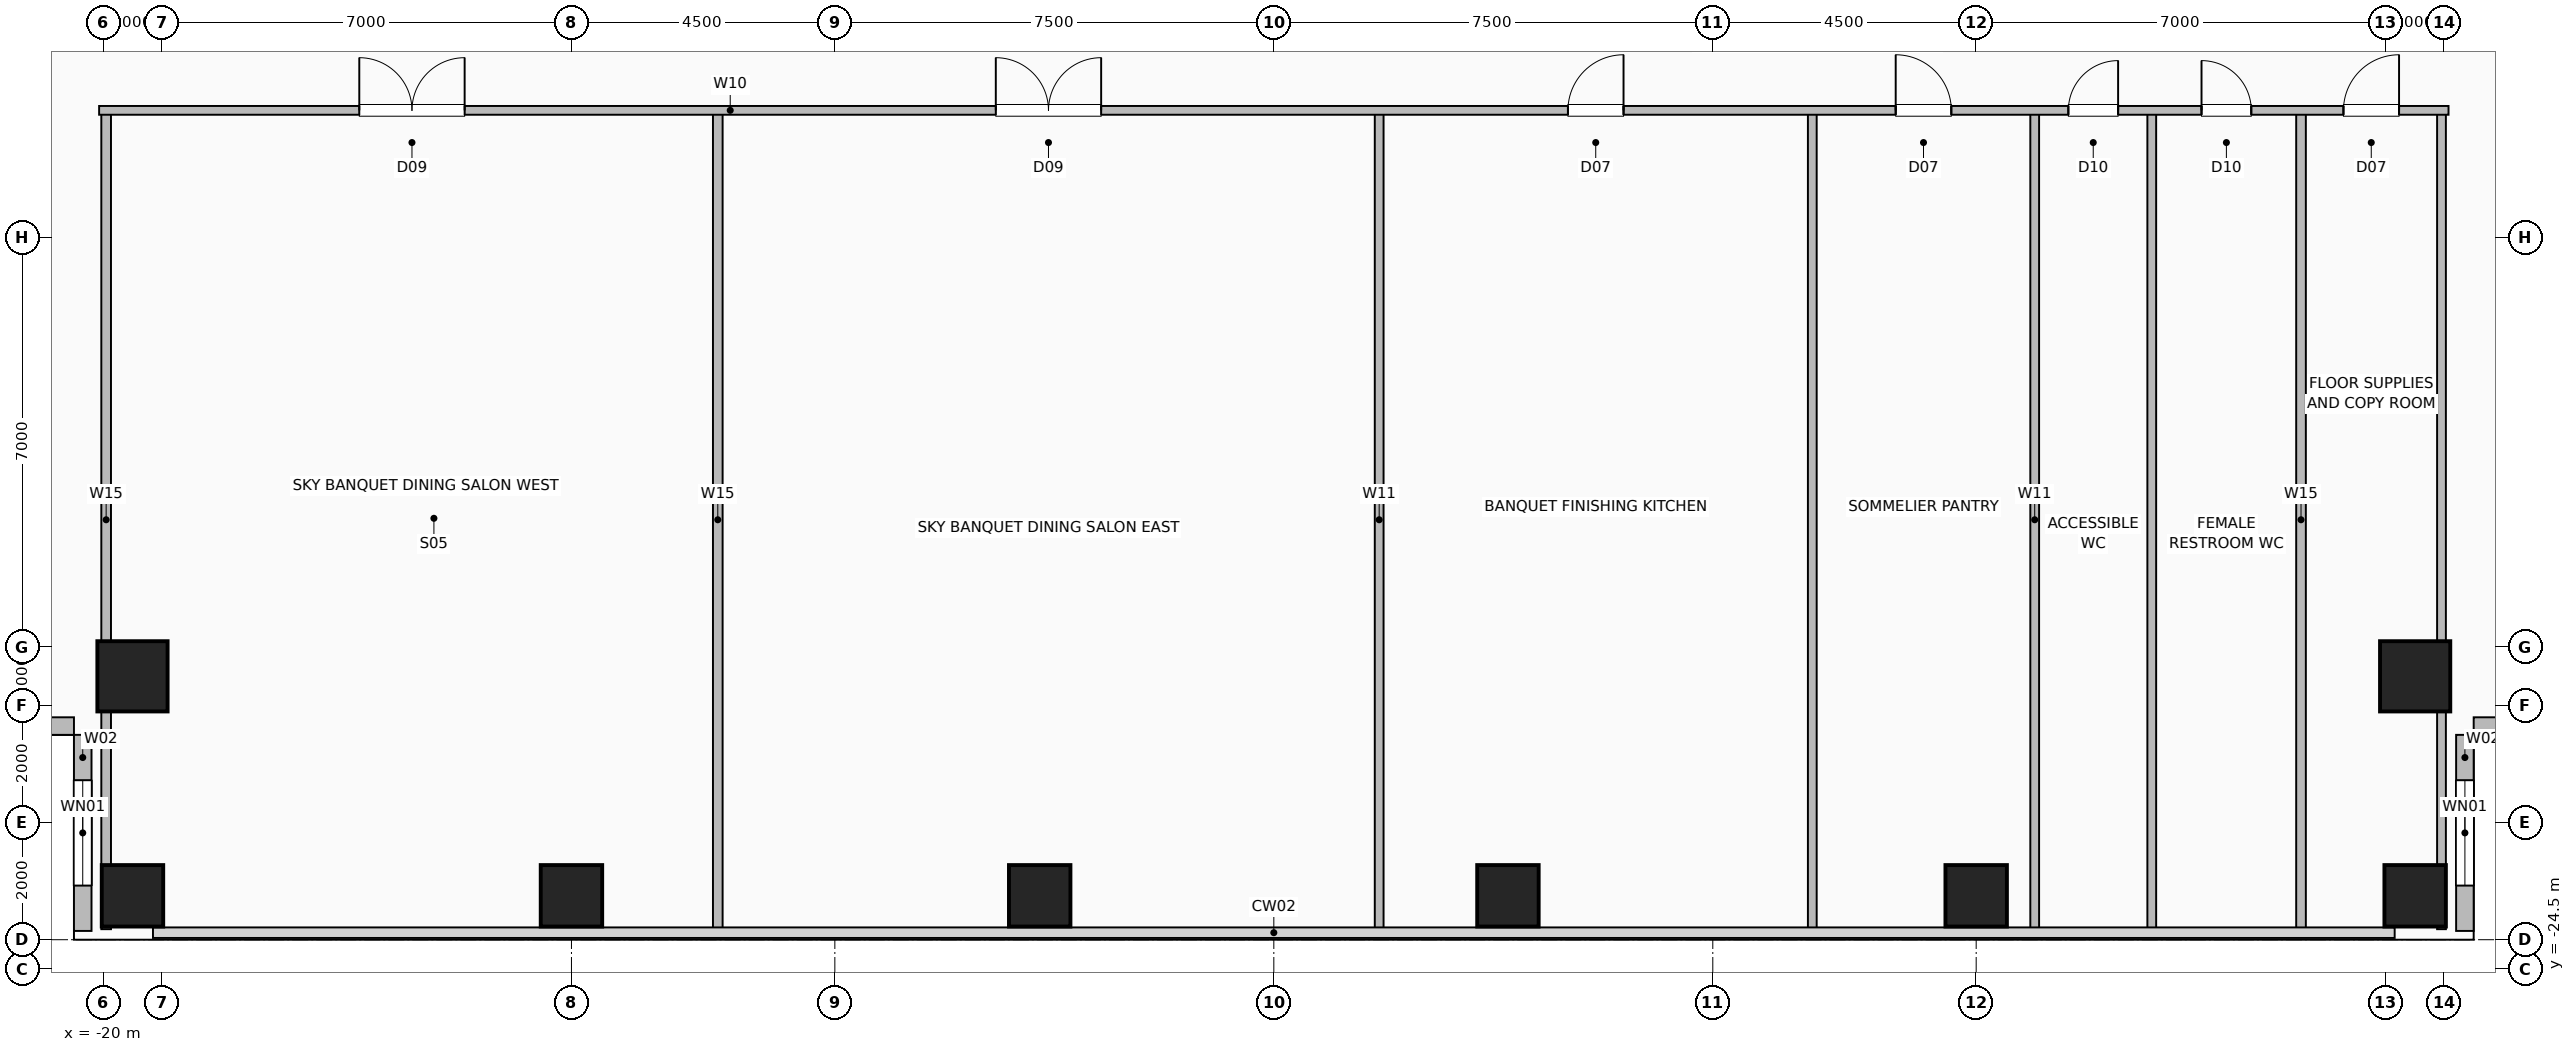
"""IFC4 building model, lengths in metres.
Left out: names, types, materials, properties, quantities, classifications, styles, units other than length and angle.
Written with IfcOpenShell. Run it as: python <this file> out.ifc"""

import sys

from ifc_helpers import new_model, si_unit, direction, frame, frame_2d, origin, origin_2d, place, context, subcontext, project, spatial, rectangle, hollow_rectangle, extrude, element, fill, save


model = new_model("IFC4")
c1 = context("Model", 3, precision=1e-05, world=origin(), true_north=direction((0.0, 1.0)))
c2 = subcontext(c1, "Body", "Model", "MODEL_VIEW")
j1 = project(units=[si_unit("LENGTHUNIT", "METRE"), si_unit("PLANEANGLEUNIT", "RADIAN")], contexts=[c1])
p1 = place(None, origin())
s1 = spatial("IfcSite", under=j1, at=p1, CompositionType="ELEMENT")
p2 = place(p1, origin())
s2 = spatial("IfcBuilding", under=s1, at=p2, CompositionType="ELEMENT")
p3 = place(p2, frame((0.0, 0.0, 72.5)))
s3 = spatial("IfcBuildingStorey", under=s2, at=p3, CompositionType="ELEMENT", Elevation=72.5)
for number, where, z_axis, x_axis in (
    (1, (-19.5, -23.25, 0.0), (0.0, 0.0, 1.0), (1.0, 0.0, 0.0)),
    (2, (-12.0, -23.25, 0.0), (0.0, 0.0, 1.0), (1.0, 0.0, 0.0)),
    (3, (-4.0, -23.25, 0.0), (0.0, 0.0, 1.0), (1.0, 0.0, 0.0)),
    (4, (4.0, -23.25, 0.0), (0.0, 0.0, 1.0), (1.0, 0.0, 0.0)),
    (5, (12.0, -23.25, 0.0), (0.0, 0.0, 1.0), (1.0, 0.0, 0.0)),
    (6, (19.5, -23.25, 0.0), (0.0, 0.0, 1.0), (1.0, 0.0, 0.0)),
):
    element("IfcColumn", number, at=place(p3, frame(where, z_axis=z_axis, x_axis=x_axis)), inside=s3, PredefinedType="COLUMN", context=c2, shape_type="SweptSolid", body=[
        extrude(hollow_rectangle(XDim=1.05, YDim=1.05, WallThickness=0.05, at=origin_2d()), origin(), (0.0, 0.0, 1.0), 3.5),
    ])
for number, where, z_axis, x_axis in (
    (7, (-19.5, -19.5, 0.0), (0.0, 0.0, 1.0), (1.0, 0.0, 0.0)),
    (8, (19.5, -19.5, 0.0), (0.0, 0.0, 1.0), (1.0, 0.0, 0.0)),
):
    element("IfcColumn", number, at=place(p3, frame(where, z_axis=z_axis, x_axis=x_axis)), inside=s3, PredefinedType="COLUMN", context=c2, shape_type="SweptSolid", body=[
        extrude(hollow_rectangle(XDim=1.2, YDim=1.2, WallThickness=0.055, at=origin_2d()), origin(), (0.0, 0.0, 1.0), 3.5),
    ])
p4 = place(p3, frame((-20.35, -23.85, 0.0), z_axis=(0.0, 0.0, 1.0), x_axis=(0.0, 1.0, 0.0)))
e9 = element("IfcWall", 9, at=p4, inside=s3, PredefinedType="SOLIDWALL", context=c2, shape_type="SweptSolid", body=[
    extrude(rectangle(XDim=3.35, YDim=0.3, at=frame_2d((1.675, 0.0))), origin(), (0.0, 0.0, 1.0), 3.25),
])
p5 = place(p4, frame((0.775, 0.0, 0.9)))
e10 = element("IfcOpeningElement", 10, at=p5, cuts=e9, PredefinedType="OPENING", context=c2, shape_type="SweptSolid", body=[
    extrude(rectangle(XDim=1.8, YDim=1.8, at=frame_2d((0.9, 0.9))), frame((0.0, 0.16, 0.0), z_axis=(0.0, -1.0, 0.0), x_axis=(1.0, 0.0, 0.0)), (0.0, 0.0, 1.0), 0.32),
])
p6 = place(p3, frame((-23.85, -20.35, 0.0), z_axis=(0.0, 0.0, 1.0), x_axis=(1.0, 0.0, 0.0)))
e11 = element("IfcWall", 11, at=p6, inside=s3, PredefinedType="SOLIDWALL", context=c2, shape_type="SweptSolid", body=[
    extrude(rectangle(XDim=3.35, YDim=0.3, at=frame_2d((1.675, 0.0))), origin(), (0.0, 0.0, 1.0), 3.25),
])
p7 = place(p3, frame((20.35, -23.85, 0.0), z_axis=(0.0, 0.0, 1.0), x_axis=(0.0, 1.0, 0.0)))
e12 = element("IfcWall", 12, at=p7, inside=s3, PredefinedType="SOLIDWALL", context=c2, shape_type="SweptSolid", body=[
    extrude(rectangle(XDim=3.35, YDim=0.3, at=frame_2d((1.675, 0.0))), origin(), (0.0, 0.0, 1.0), 3.25),
])
p8 = place(p7, frame((0.775, 0.0, 0.9)))
e13 = element("IfcOpeningElement", 13, at=p8, cuts=e12, PredefinedType="OPENING", context=c2, shape_type="SweptSolid", body=[
    extrude(rectangle(XDim=1.8, YDim=1.8, at=frame_2d((0.9, 0.9))), frame((0.0, 0.16, 0.0), z_axis=(0.0, -1.0, 0.0), x_axis=(1.0, 0.0, 0.0)), (0.0, 0.0, 1.0), 0.32),
])
p9 = place(p3, frame((23.85, -20.35, 0.0), z_axis=(0.0, 0.0, 1.0), x_axis=(-1.0, 0.0, 0.0)))
e14 = element("IfcWall", 14, at=p9, inside=s3, PredefinedType="SOLIDWALL", context=c2, shape_type="SweptSolid", body=[
    extrude(rectangle(XDim=3.35, YDim=0.3, at=frame_2d((1.675, 0.0))), origin(), (0.0, 0.0, 1.0), 3.25),
])
for number, where, z_axis, x_axis in (
    (15, (17.55, -23.82, 0.0), (0.0, 0.0, 1.0), (0.0, 1.0, 0.0)),
    (16, (-19.95, -23.82, 0.0), (0.0, 0.0, 1.0), (0.0, 1.0, 0.0)),
    (17, (-9.5, -23.82, 0.0), (0.0, 0.0, 1.0), (0.0, 1.0, 0.0)),
):
    element("IfcWall", number, at=place(p3, frame(where, z_axis=z_axis, x_axis=x_axis)), inside=s3, PredefinedType="PLUMBINGWALL", context=c2, shape_type="SweptSolid", body=[
        extrude(rectangle(XDim=13.99, YDim=0.165, at=frame_2d((6.995, 0.0))), origin(), (0.0, 0.0, 1.0), 3.25),
    ])
for number, where, z_axis, x_axis in (
    (18, (1.8, -23.82, 0.0), (0.0, 0.0, 1.0), (0.0, 1.0, 0.0)),
    (19, (9.2, -23.82, 0.0), (0.0, 0.0, 1.0), (0.0, 1.0, 0.0)),
    (20, (13.0, -23.82, 0.0), (0.0, 0.0, 1.0), (0.0, 1.0, 0.0)),
    (21, (15.0, -23.82, 0.0), (0.0, 0.0, 1.0), (0.0, 1.0, 0.0)),
    (22, (19.95, -23.82, 0.0), (0.0, 0.0, 1.0), (0.0, 1.0, 0.0)),
):
    element("IfcWall", number, at=place(p3, frame(where, z_axis=z_axis, x_axis=x_axis)), inside=s3, PredefinedType="PARTITIONING", context=c2, shape_type="SweptSolid", body=[
        extrude(rectangle(XDim=13.99, YDim=0.15, at=frame_2d((6.995, 0.0))), origin(), (0.0, 0.0, 1.0), 3.25),
    ])
p10 = place(p3, frame((-20.07, -9.83, 0.0), z_axis=(0.0, 0.0, 1.0), x_axis=(1.0, 0.0, 0.0)))
e23 = element("IfcWall", 23, at=p10, inside=s3, PredefinedType="PARTITIONING", context=c2, shape_type="SweptSolid", body=[
    extrude(rectangle(XDim=40.14, YDim=0.15, at=frame_2d((20.07, 0.0))), origin(), (0.0, 0.0, 1.0), 3.25),
])
p11 = place(p10, frame((4.445, 0.0, 0.0)))
e24 = element("IfcOpeningElement", 24, at=p11, cuts=e23, PredefinedType="OPENING", context=c2, shape_type="SweptSolid", body=[
    extrude(rectangle(XDim=1.8, YDim=2.08, at=frame_2d((0.9, 1.04))), frame((0.0, 0.085, 0.0), z_axis=(0.0, -1.0, 0.0), x_axis=(1.0, 0.0, 0.0)), (0.0, 0.0, 1.0), 0.17),
])
p12 = place(p10, frame((15.32, 0.0, 0.0)))
e25 = element("IfcOpeningElement", 25, at=p12, cuts=e23, PredefinedType="OPENING", context=c2, shape_type="SweptSolid", body=[
    extrude(rectangle(XDim=1.8, YDim=2.08, at=frame_2d((0.9, 1.04))), frame((0.0, 0.085, 0.0), z_axis=(0.0, -1.0, 0.0), x_axis=(1.0, 0.0, 0.0)), (0.0, 0.0, 1.0), 0.17),
])
p13 = place(p10, frame((25.095, 0.0, 0.0)))
e26 = element("IfcOpeningElement", 26, at=p13, cuts=e23, PredefinedType="OPENING", context=c2, shape_type="SweptSolid", body=[
    extrude(rectangle(XDim=0.95, YDim=2.06, at=frame_2d((0.475, 1.03))), frame((0.0, 0.085, 0.0), z_axis=(0.0, -1.0, 0.0), x_axis=(1.0, 0.0, 0.0)), (0.0, 0.0, 1.0), 0.17),
])
p14 = place(p10, frame((30.695, 0.0, 0.0)))
e27 = element("IfcOpeningElement", 27, at=p14, cuts=e23, PredefinedType="OPENING", context=c2, shape_type="SweptSolid", body=[
    extrude(rectangle(XDim=0.95, YDim=2.06, at=frame_2d((0.475, 1.03))), frame((0.0, 0.085, 0.0), z_axis=(0.0, -1.0, 0.0), x_axis=(1.0, 0.0, 0.0)), (0.0, 0.0, 1.0), 0.17),
])
p15 = place(p10, frame((33.645, 0.0, 0.0)))
e28 = element("IfcOpeningElement", 28, at=p15, cuts=e23, PredefinedType="OPENING", context=c2, shape_type="SweptSolid", body=[
    extrude(rectangle(XDim=0.85, YDim=2.05, at=frame_2d((0.425, 1.025))), frame((0.0, 0.085, 0.0), z_axis=(0.0, -1.0, 0.0), x_axis=(1.0, 0.0, 0.0)), (0.0, 0.0, 1.0), 0.17),
])
p16 = place(p10, frame((35.92, 0.0, 0.0)))
e29 = element("IfcOpeningElement", 29, at=p16, cuts=e23, PredefinedType="OPENING", context=c2, shape_type="SweptSolid", body=[
    extrude(rectangle(XDim=0.85, YDim=2.05, at=frame_2d((0.425, 1.025))), frame((0.0, 0.085, 0.0), z_axis=(0.0, -1.0, 0.0), x_axis=(1.0, 0.0, 0.0)), (0.0, 0.0, 1.0), 0.17),
])
p17 = place(p10, frame((38.345, 0.0, 0.0)))
e30 = element("IfcOpeningElement", 30, at=p17, cuts=e23, PredefinedType="OPENING", context=c2, shape_type="SweptSolid", body=[
    extrude(rectangle(XDim=0.95, YDim=2.06, at=frame_2d((0.475, 1.03))), frame((0.0, 0.085, 0.0), z_axis=(0.0, -1.0, 0.0), x_axis=(1.0, 0.0, 0.0)), (0.0, 0.0, 1.0), 0.17),
])
p18 = place(p5, origin())
e31 = element("IfcWindow", 31, at=p18, inside=s3, PartitioningType="SINGLE_PANEL", PredefinedType="WINDOW", context=c2, shape_type="SweptSolid", body=[
    extrude(rectangle(XDim=1.8, YDim=1.8, at=frame_2d((0.9, 0.9))), frame((0.0, 0.03, 0.0), z_axis=(0.0, -1.0, 0.0), x_axis=(1.0, 0.0, 0.0)), (0.0, 0.0, 1.0), 0.06),
])
fill(e10, e31)
p19 = place(p8, origin())
e32 = element("IfcWindow", 32, at=p19, inside=s3, PartitioningType="SINGLE_PANEL", PredefinedType="WINDOW", context=c2, shape_type="SweptSolid", body=[
    extrude(rectangle(XDim=1.8, YDim=1.8, at=frame_2d((0.9, 0.9))), frame((0.0, 0.03, 0.0), z_axis=(0.0, -1.0, 0.0), x_axis=(1.0, 0.0, 0.0)), (0.0, 0.0, 1.0), 0.06),
])
fill(e13, e32)
p20 = place(p11, origin())
e33 = element("IfcDoor", 33, at=p20, inside=s3, OperationType="DOUBLE_DOOR_SINGLE_SWING", PredefinedType="DOOR", context=c2, shape_type="SweptSolid", body=[
    extrude(rectangle(XDim=1.8, YDim=2.08, at=frame_2d((0.9, 1.04))), frame((0.0, 0.025, 0.0), z_axis=(0.0, -1.0, 0.0), x_axis=(1.0, 0.0, 0.0)), (0.0, 0.0, 1.0), 0.05),
])
fill(e24, e33)
p21 = place(p12, origin())
e34 = element("IfcDoor", 34, at=p21, inside=s3, OperationType="DOUBLE_DOOR_SINGLE_SWING", PredefinedType="DOOR", context=c2, shape_type="SweptSolid", body=[
    extrude(rectangle(XDim=1.8, YDim=2.08, at=frame_2d((0.9, 1.04))), frame((0.0, 0.025, 0.0), z_axis=(0.0, -1.0, 0.0), x_axis=(1.0, 0.0, 0.0)), (0.0, 0.0, 1.0), 0.05),
])
fill(e25, e34)
p22 = place(p13, origin())
e35 = element("IfcDoor", 35, at=p22, inside=s3, OperationType="SINGLE_SWING_RIGHT", PredefinedType="DOOR", context=c2, shape_type="SweptSolid", body=[
    extrude(rectangle(XDim=0.95, YDim=2.06, at=frame_2d((0.475, 1.03))), frame((0.0, 0.025, 0.0), z_axis=(0.0, -1.0, 0.0), x_axis=(1.0, 0.0, 0.0)), (0.0, 0.0, 1.0), 0.05),
])
fill(e26, e35)
p23 = place(p14, origin())
e36 = element("IfcDoor", 36, at=p23, inside=s3, OperationType="SINGLE_SWING_LEFT", PredefinedType="DOOR", context=c2, shape_type="SweptSolid", body=[
    extrude(rectangle(XDim=0.95, YDim=2.06, at=frame_2d((0.475, 1.03))), frame((0.0, 0.025, 0.0), z_axis=(0.0, -1.0, 0.0), x_axis=(1.0, 0.0, 0.0)), (0.0, 0.0, 1.0), 0.05),
])
fill(e27, e36)
p24 = place(p15, origin())
e37 = element("IfcDoor", 37, at=p24, inside=s3, OperationType="SINGLE_SWING_RIGHT", PredefinedType="DOOR", context=c2, shape_type="SweptSolid", body=[
    extrude(rectangle(XDim=0.85, YDim=2.05, at=frame_2d((0.425, 1.025))), frame((0.0, 0.025, 0.0), z_axis=(0.0, -1.0, 0.0), x_axis=(1.0, 0.0, 0.0)), (0.0, 0.0, 1.0), 0.05),
])
fill(e28, e37)
p25 = place(p16, origin())
e38 = element("IfcDoor", 38, at=p25, inside=s3, OperationType="SINGLE_SWING_LEFT", PredefinedType="DOOR", context=c2, shape_type="SweptSolid", body=[
    extrude(rectangle(XDim=0.85, YDim=2.05, at=frame_2d((0.425, 1.025))), frame((0.0, 0.025, 0.0), z_axis=(0.0, -1.0, 0.0), x_axis=(1.0, 0.0, 0.0)), (0.0, 0.0, 1.0), 0.05),
])
fill(e29, e38)
p26 = place(p17, origin())
e39 = element("IfcDoor", 39, at=p26, inside=s3, OperationType="SINGLE_SWING_RIGHT", PredefinedType="DOOR", context=c2, shape_type="SweptSolid", body=[
    extrude(rectangle(XDim=0.95, YDim=2.06, at=frame_2d((0.475, 1.03))), frame((0.0, 0.025, 0.0), z_axis=(0.0, -1.0, 0.0), x_axis=(1.0, 0.0, 0.0)), (0.0, 0.0, 1.0), 0.05),
])
fill(e30, e39)
save(model, sys.argv[1])
